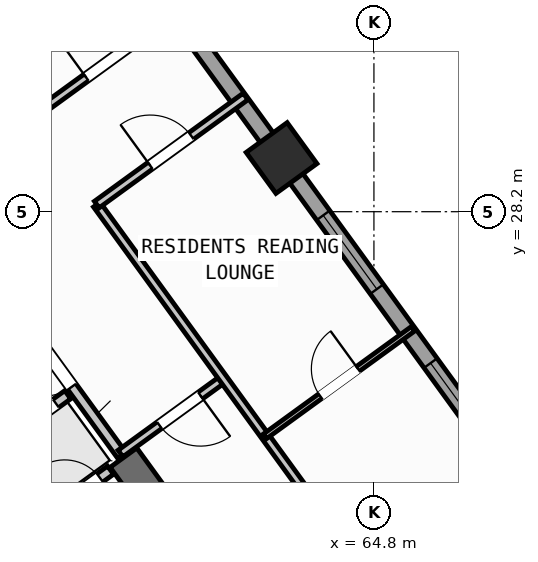
"""IFC4 building model, lengths in metres.
Left out: names, types, materials, properties, quantities, classifications, styles, units other than length and angle.
Written with IfcOpenShell. Run it as: python <this file> out.ifc"""

import sys

from ifc_helpers import new_model, si_unit, direction, frame, frame_2d, origin, origin_2d, place, context, subcontext, project, spatial, rectangle, hollow_rectangle, extrude, source, transform, mapped, element, fill, save


model = new_model("IFC4")
c1 = context("Model", 3, precision=1e-05, world=origin(), true_north=direction((0.0, 1.0)))
c2 = subcontext(c1, "Body", "Model", "MODEL_VIEW")
j1 = project(units=[si_unit("LENGTHUNIT", "METRE"), si_unit("PLANEANGLEUNIT", "RADIAN")], contexts=[c1])
p1 = place(None, origin())
s1 = spatial("IfcSite", under=j1, at=p1, CompositionType="ELEMENT")
p2 = place(p1, origin())
s2 = spatial("IfcBuilding", under=s1, at=p2, CompositionType="ELEMENT")
p3 = place(p2, frame((0.0, 0.0, 71.7)))
s3 = spatial("IfcBuildingStorey", under=s2, at=p3, CompositionType="ELEMENT", Elevation=71.7)
p4 = place(p3, frame((61.929, 20.494, 0.0), z_axis=(0.0, 0.0, 1.0), x_axis=(-0.58782982593, 0.808984607855, 0.0)))
e1 = element("IfcWall", 1, at=p4, inside=s3, PredefinedType="SHEAR", context=c2, shape_type="SweptSolid", body=[
    extrude(rectangle(XDim=3.525, YDim=0.65, at=frame_2d((1.762, 0.0))), origin(), (0.0, 0.0, 1.0), 4.52),
])
m1 = source(origin(), c2, "Body", "SweptSolid", [
    extrude(hollow_rectangle(XDim=1.0, YDim=1.0, WallThickness=0.04, at=origin_2d()), origin(), (0.0, 0.0, 1.0), 4.8),
])
p5 = place(p3, frame((62.977, 29.259, 0.0), z_axis=(0.0, 0.0, 1.0), x_axis=(0.809016994375, 0.587785252292, 0.0)))
e2 = element("IfcColumn", 2, at=p5, inside=s3, PredefinedType="COLUMN", context=c2, shape_type="MappedRepresentation", body=[
    mapped(m1, transform((0.0, 0.0, 0.0), scale=1.0)),
])
p6 = place(p3, frame((54.81, 40.5, 0.0), z_axis=(0.0, 0.0, 1.0), x_axis=(0.587783625747, -0.809018176127, 0.0)))
e3 = element("IfcWall", 3, at=p6, inside=s3, PredefinedType="STANDARD", context=c2, shape_type="SweptSolid", body=[
    extrude(rectangle(XDim=21.587, YDim=0.32, at=frame_2d((10.794, 0.0))), origin(), (0.0, 0.0, 1.0), 3.895),
])
p7 = place(p6, frame((7.729, 0.0, 0.85)))
e4 = element("IfcOpeningElement", 4, at=p7, cuts=e3, PredefinedType="OPENING", context=c2, shape_type="SweptSolid", body=[
    extrude(rectangle(XDim=1.8, YDim=1.5, at=frame_2d((0.9, 0.75))), frame((0.0, 0.17, 0.0), z_axis=(0.0, -1.0, 0.0), x_axis=(1.0, 0.0, 0.0)), (0.0, 0.0, 1.0), 0.34),
])
p8 = place(p6, frame((15.292, 0.0, 0.85)))
e5 = element("IfcOpeningElement", 5, at=p8, cuts=e3, PredefinedType="OPENING", context=c2, shape_type="SweptSolid", body=[
    extrude(rectangle(XDim=1.8, YDim=1.5, at=frame_2d((0.9, 0.75))), frame((0.0, 0.17, 0.0), z_axis=(0.0, -1.0, 0.0), x_axis=(1.0, 0.0, 0.0)), (0.0, 0.0, 1.0), 0.34),
])
p9 = place(p6, frame((18.897, 0.0, 0.95)))
e6 = element("IfcOpeningElement", 6, at=p9, cuts=e3, PredefinedType="OPENING", context=c2, shape_type="SweptSolid", body=[
    extrude(rectangle(XDim=1.2, YDim=1.4, at=frame_2d((0.6, 0.7))), frame((0.0, 0.17, 0.0), z_axis=(0.0, -1.0, 0.0), x_axis=(1.0, 0.0, 0.0)), (0.0, 0.0, 1.0), 0.34),
])
p10 = place(p3, frame((67.454, 22.747, 0.0), z_axis=(0.0, 0.0, 1.0), x_axis=(-0.809021120468, -0.587779573171, 0.0)))
e7 = element("IfcWall", 7, at=p10, inside=s3, PredefinedType="STANDARD", context=c2, shape_type="SweptSolid", body=[
    extrude(rectangle(XDim=17.588, YDim=0.32, at=frame_2d((8.794, 0.0))), origin(), (0.0, 0.0, 1.0), 4.52),
])
p11 = place(p10, frame((1.624, 0.0, 0.0)))
e8 = element("IfcOpeningElement", 8, at=p11, cuts=e7, PredefinedType="OPENING", context=c2, shape_type="SweptSolid", body=[
    extrude(rectangle(XDim=1.05, YDim=2.15, at=frame_2d((0.525, 1.075))), frame((0.0, 0.17, 0.0), z_axis=(0.0, -1.0, 0.0), x_axis=(1.0, 0.0, 0.0)), (0.0, 0.0, 1.0), 0.34),
])
p12 = place(p10, frame((8.019, 0.0, 0.75)))
e9 = element("IfcOpeningElement", 9, at=p12, cuts=e7, PredefinedType="OPENING", context=c2, shape_type="SweptSolid", body=[
    extrude(rectangle(XDim=2.4, YDim=1.6, at=frame_2d((1.2, 0.8))), frame((0.0, 0.17, 0.0), z_axis=(0.0, -1.0, 0.0), x_axis=(1.0, 0.0, 0.0)), (0.0, 0.0, 1.0), 0.34),
])
p13 = place(p10, frame((13.169, 0.0, 0.75)))
e10 = element("IfcOpeningElement", 10, at=p13, cuts=e7, PredefinedType="OPENING", context=c2, shape_type="SweptSolid", body=[
    extrude(rectangle(XDim=2.4, YDim=1.6, at=frame_2d((1.2, 0.8))), frame((0.0, 0.17, 0.0), z_axis=(0.0, -1.0, 0.0), x_axis=(1.0, 0.0, 0.0)), (0.0, 0.0, 1.0), 0.34),
])
p14 = place(p3, frame((56.553, 20.884, 0.0), z_axis=(0.0, 0.0, 1.0), x_axis=(0.809035789462, 0.587759382205, 0.0)))
e11 = element("IfcWall", 11, at=p14, inside=s3, PredefinedType="STANDARD", context=c2, shape_type="SweptSolid", body=[
    extrude(rectangle(XDim=3.768, YDim=0.2, at=frame_2d((1.884, 0.0))), origin(), (0.0, 0.0, 1.0), 4.51),
])
p15 = place(p14, frame((2.65, 0.0, 0.0)))
e12 = element("IfcOpeningElement", 12, at=p15, cuts=e11, PredefinedType="OPENING", context=c2, shape_type="SweptSolid", body=[
    extrude(rectangle(XDim=0.86, YDim=2.05, at=frame_2d((0.43, 1.025))), frame((0.0, 0.11, 0.0), z_axis=(0.0, -1.0, 0.0), x_axis=(1.0, 0.0, 0.0)), (0.0, 0.0, 1.0), 0.22),
])
p16 = place(p3, frame((54.421, 21.436, 0.0), z_axis=(0.0, 0.0, 1.0), x_axis=(0.809013710463, 0.587789772183, 0.0)))
e13 = element("IfcWall", 13, at=p16, inside=s3, PredefinedType="STANDARD", context=c2, shape_type="SweptSolid", body=[
    extrude(rectangle(XDim=5.36, YDim=0.2, at=frame_2d((2.68, 0.0))), origin(), (0.0, 0.0, 1.0), 4.51),
])
p17 = place(p16, frame((0.37, 0.0, 0.0)))
e14 = element("IfcOpeningElement", 14, at=p17, cuts=e13, PredefinedType="OPENING", context=c2, shape_type="SweptSolid", body=[
    extrude(rectangle(XDim=1.1, YDim=2.15, at=frame_2d((0.55, 1.075))), frame((0.0, 0.11, 0.0), z_axis=(0.0, -1.0, 0.0), x_axis=(1.0, 0.0, 0.0)), (0.0, 0.0, 1.0), 0.22),
])
p18 = place(p16, frame((2.17, 0.0, 0.0)))
e15 = element("IfcOpeningElement", 15, at=p18, cuts=e13, PredefinedType="OPENING", context=c2, shape_type="SweptSolid", body=[
    extrude(rectangle(XDim=1.1, YDim=2.15, at=frame_2d((0.55, 1.075))), frame((0.0, 0.11, 0.0), z_axis=(0.0, -1.0, 0.0), x_axis=(1.0, 0.0, 0.0)), (0.0, 0.0, 1.0), 0.22),
])
p19 = place(p16, frame((3.97, 0.0, 0.0)))
e16 = element("IfcOpeningElement", 16, at=p19, cuts=e13, PredefinedType="OPENING", context=c2, shape_type="SweptSolid", body=[
    extrude(rectangle(XDim=1.1, YDim=2.15, at=frame_2d((0.55, 1.075))), frame((0.0, 0.11, 0.0), z_axis=(0.0, -1.0, 0.0), x_axis=(1.0, 0.0, 0.0)), (0.0, 0.0, 1.0), 0.22),
])
p20 = place(p3, frame((59.827, 23.386, 0.0), z_axis=(0.0, 0.0, 1.0), x_axis=(-0.587803840107, 0.809003489211, 0.0)))
e17 = element("IfcWall", 17, at=p20, inside=s3, PredefinedType="STANDARD", context=c2, shape_type="SweptSolid", body=[
    extrude(rectangle(XDim=2.96, YDim=0.2, at=frame_2d((1.48, 0.0))), origin(), (0.0, 0.0, 1.0), 4.51),
])
p21 = place(p20, frame((1.68, 0.0, 0.0)))
e18 = element("IfcOpeningElement", 18, at=p21, cuts=e17, PredefinedType="OPENING", context=c2, shape_type="SweptSolid", body=[
    extrude(rectangle(XDim=1.0, YDim=2.1, at=frame_2d((0.5, 1.05))), frame((0.0, 0.11, 0.0), z_axis=(0.0, -1.0, 0.0), x_axis=(1.0, 0.0, 0.0)), (0.0, 0.0, 1.0), 0.22),
])
p22 = place(p3, frame((59.798, 23.427, 0.0), z_axis=(0.0, 0.0, 1.0), x_axis=(0.809034604122, 0.587761013791, 0.0)))
e19 = element("IfcWall", 19, at=p22, inside=s3, PredefinedType="PARTITIONING", context=c2, shape_type="SweptSolid", body=[
    extrude(rectangle(XDim=2.51, YDim=0.16, at=frame_2d((1.255, 0.0))), origin(), (0.0, 0.0, 1.0), 4.51),
])
p23 = place(p22, frame((0.95, 0.0, 0.0)))
e20 = element("IfcOpeningElement", 20, at=p23, cuts=e19, PredefinedType="OPENING", context=c2, shape_type="SweptSolid", body=[
    extrude(rectangle(XDim=1.0, YDim=2.1, at=frame_2d((0.5, 1.05))), frame((0.0, 0.09, 0.0), z_axis=(0.0, -1.0, 0.0), x_axis=(1.0, 0.0, 0.0)), (0.0, 0.0, 1.0), 0.18),
])
p24 = place(p3, frame((64.709, 20.938, 0.0), z_axis=(0.0, 0.0, 1.0), x_axis=(-0.587776590479, 0.80902328748, 0.0)))
e21 = element("IfcWall", 21, at=p24, inside=s3, PredefinedType="PARTITIONING", context=c2, shape_type="SweptSolid", body=[
    extrude(rectangle(XDim=9.15, YDim=0.16, at=frame_2d((4.575, 0.0))), origin(), (0.0, 0.0, 1.0), 4.51),
])
p25 = place(p3, frame((59.331, 28.341, 0.0), z_axis=(0.0, 0.0, 1.0), x_axis=(0.809003564202, 0.587803736896, 0.0)))
e22 = element("IfcWall", 22, at=p25, inside=s3, PredefinedType="PARTITIONING", context=c2, shape_type="SweptSolid", body=[
    extrude(rectangle(XDim=3.63, YDim=0.16, at=frame_2d((1.815, 0.0))), origin(), (0.0, 0.0, 1.0), 4.51),
])
p26 = place(p25, frame((1.305, 0.0, 0.0)))
e23 = element("IfcOpeningElement", 23, at=p26, cuts=e22, PredefinedType="OPENING", context=c2, shape_type="SweptSolid", body=[
    extrude(rectangle(XDim=1.0, YDim=2.1, at=frame_2d((0.5, 1.05))), frame((0.0, 0.09, 0.0), z_axis=(0.0, -1.0, 0.0), x_axis=(1.0, 0.0, 0.0)), (0.0, 0.0, 1.0), 0.18),
])
p27 = place(p3, frame((58.067, 30.08, 0.0), z_axis=(0.0, 0.0, 1.0), x_axis=(0.809012309495, 0.587791700422, 0.0)))
e24 = element("IfcWall", 24, at=p27, inside=s3, PredefinedType="PARTITIONING", context=c2, shape_type="SweptSolid", body=[
    extrude(rectangle(XDim=3.63, YDim=0.16, at=frame_2d((1.815, 0.0))), origin(), (0.0, 0.0, 1.0), 4.51),
])
p28 = place(p27, frame((1.305, 0.0, 0.0)))
e25 = element("IfcOpeningElement", 25, at=p28, cuts=e24, PredefinedType="OPENING", context=c2, shape_type="SweptSolid", body=[
    extrude(rectangle(XDim=1.0, YDim=2.1, at=frame_2d((0.5, 1.05))), frame((0.0, 0.09, 0.0), z_axis=(0.0, -1.0, 0.0), x_axis=(1.0, 0.0, 0.0)), (0.0, 0.0, 1.0), 0.18),
])
p29 = place(p3, frame((62.653, 23.768, 0.0), z_axis=(0.0, 0.0, 1.0), x_axis=(0.809037198293, 0.58775744298, 0.0)))
e26 = element("IfcWall", 26, at=p29, inside=s3, PredefinedType="PARTITIONING", context=c2, shape_type="SweptSolid", body=[
    extrude(rectangle(XDim=3.61, YDim=0.11, at=frame_2d((1.805, 0.0))), origin(), (0.0, 0.0, 1.0), 4.51),
])
p30 = place(p29, frame((1.345, 0.0, 0.0)))
e27 = element("IfcOpeningElement", 27, at=p30, cuts=e26, PredefinedType="OPENING", context=c2, shape_type="SweptSolid", body=[
    extrude(rectangle(XDim=0.92, YDim=2.08, at=frame_2d((0.46, 1.04))), frame((0.0, 0.065, 0.0), z_axis=(0.0, -1.0, 0.0), x_axis=(1.0, 0.0, 0.0)), (0.0, 0.0, 1.0), 0.13),
])
m2 = source(origin(), c2, "Body", "SweptSolid", [
    extrude(rectangle(XDim=1.8, YDim=1.5, at=frame_2d((0.9, 0.75))), frame((0.0, 0.03, 0.0), z_axis=(0.0, -1.0, 0.0), x_axis=(1.0, 0.0, 0.0)), (0.0, 0.0, 1.0), 0.06),
])
p31 = place(p8, origin())
e28 = element("IfcWindow", 28, at=p31, inside=s3, PartitioningType="SINGLE_PANEL", PredefinedType="WINDOW", context=c2, shape_type="MappedRepresentation", body=[
    mapped(m2, transform((0.0, 0.0, 0.0), scale=1.0)),
])
fill(e5, e28)
m3 = source(origin(), c2, "Body", "SweptSolid", [
    extrude(rectangle(XDim=1.2, YDim=1.4, at=frame_2d((0.6, 0.7))), frame((0.0, 0.03, 0.0), z_axis=(0.0, -1.0, 0.0), x_axis=(1.0, 0.0, 0.0)), (0.0, 0.0, 1.0), 0.06),
])
p32 = place(p9, origin())
e29 = element("IfcWindow", 29, at=p32, inside=s3, PartitioningType="SINGLE_PANEL", PredefinedType="WINDOW", context=c2, shape_type="MappedRepresentation", body=[
    mapped(m3, transform((0.0, 0.0, 0.0), scale=1.0)),
])
fill(e6, e29)
m4 = source(origin(), c2, "Body", "SweptSolid", [
    extrude(rectangle(XDim=1.1, YDim=2.15, at=frame_2d((0.55, 1.075))), frame((0.0, 0.025, 0.0), z_axis=(0.0, -1.0, 0.0), x_axis=(1.0, 0.0, 0.0)), (0.0, 0.0, 1.0), 0.05),
])
p33 = place(p19, origin())
e30 = element("IfcDoor", 30, at=p33, inside=s3, OperationType="DOUBLE_DOOR_SLIDING", PredefinedType="DOOR", context=c2, shape_type="MappedRepresentation", body=[
    mapped(m4, transform((0.0, 0.0, 0.0), scale=1.0)),
])
fill(e16, e30)
m5 = source(origin(), c2, "Body", "SweptSolid", [
    extrude(rectangle(XDim=0.86, YDim=2.05, at=frame_2d((0.43, 1.025))), frame((0.0, 0.025, 0.0), z_axis=(0.0, -1.0, 0.0), x_axis=(1.0, 0.0, 0.0)), (0.0, 0.0, 1.0), 0.05),
])
p34 = place(p15, origin())
e31 = element("IfcDoor", 31, at=p34, inside=s3, OperationType="SINGLE_SWING_LEFT", PredefinedType="DOOR", context=c2, shape_type="MappedRepresentation", body=[
    mapped(m5, transform((0.0, 0.0, 0.0), scale=1.0)),
])
fill(e12, e31)
m6 = source(origin(), c2, "Body", "SweptSolid", [
    extrude(rectangle(XDim=1.0, YDim=2.1, at=frame_2d((0.5, 1.05))), frame((0.0, 0.025, 0.0), z_axis=(0.0, -1.0, 0.0), x_axis=(1.0, 0.0, 0.0)), (0.0, 0.0, 1.0), 0.05),
])
p35 = place(p23, frame((1.0, 0.0, 0.0), z_axis=(0.0, 0.0, 1.0), x_axis=(-1.0, 0.0, 0.0)))
e32 = element("IfcDoor", 32, at=p35, inside=s3, OperationType="SINGLE_SWING_LEFT", PredefinedType="DOOR", context=c2, shape_type="MappedRepresentation", body=[
    mapped(m6, transform((0.0, 0.0, 0.0), scale=1.0)),
])
fill(e20, e32)
p36 = place(p21, origin())
e33 = element("IfcDoor", 33, at=p36, inside=s3, OperationType="SINGLE_SWING_RIGHT", PredefinedType="DOOR", context=c2, shape_type="MappedRepresentation", body=[
    mapped(m6, transform((0.0, 0.0, 0.0), scale=1.0)),
])
fill(e18, e33)
p37 = place(p28, origin())
e34 = element("IfcDoor", 34, at=p37, inside=s3, OperationType="SINGLE_SWING_LEFT", PredefinedType="DOOR", context=c2, shape_type="MappedRepresentation", body=[
    mapped(m6, transform((0.0, 0.0, 0.0), scale=1.0)),
])
fill(e25, e34)
p38 = place(p26, origin())
e35 = element("IfcDoor", 35, at=p38, inside=s3, OperationType="SINGLE_SWING_LEFT", PredefinedType="DOOR", context=c2, shape_type="MappedRepresentation", body=[
    mapped(m6, transform((0.0, 0.0, 0.0), scale=1.0)),
])
fill(e23, e35)
m7 = source(origin(), c2, "Body", "SweptSolid", [
    extrude(rectangle(XDim=0.92, YDim=2.08, at=frame_2d((0.46, 1.04))), frame((0.0, 0.025, 0.0), z_axis=(0.0, -1.0, 0.0), x_axis=(1.0, 0.0, 0.0)), (0.0, 0.0, 1.0), 0.05),
])
p39 = place(p30, origin())
e36 = element("IfcDoor", 36, at=p39, inside=s3, OperationType="SINGLE_SWING_RIGHT", PredefinedType="DOOR", context=c2, shape_type="MappedRepresentation", body=[
    mapped(m7, transform((0.0, 0.0, 0.0), scale=1.0)),
])
fill(e27, e36)
save(model, sys.argv[1])
